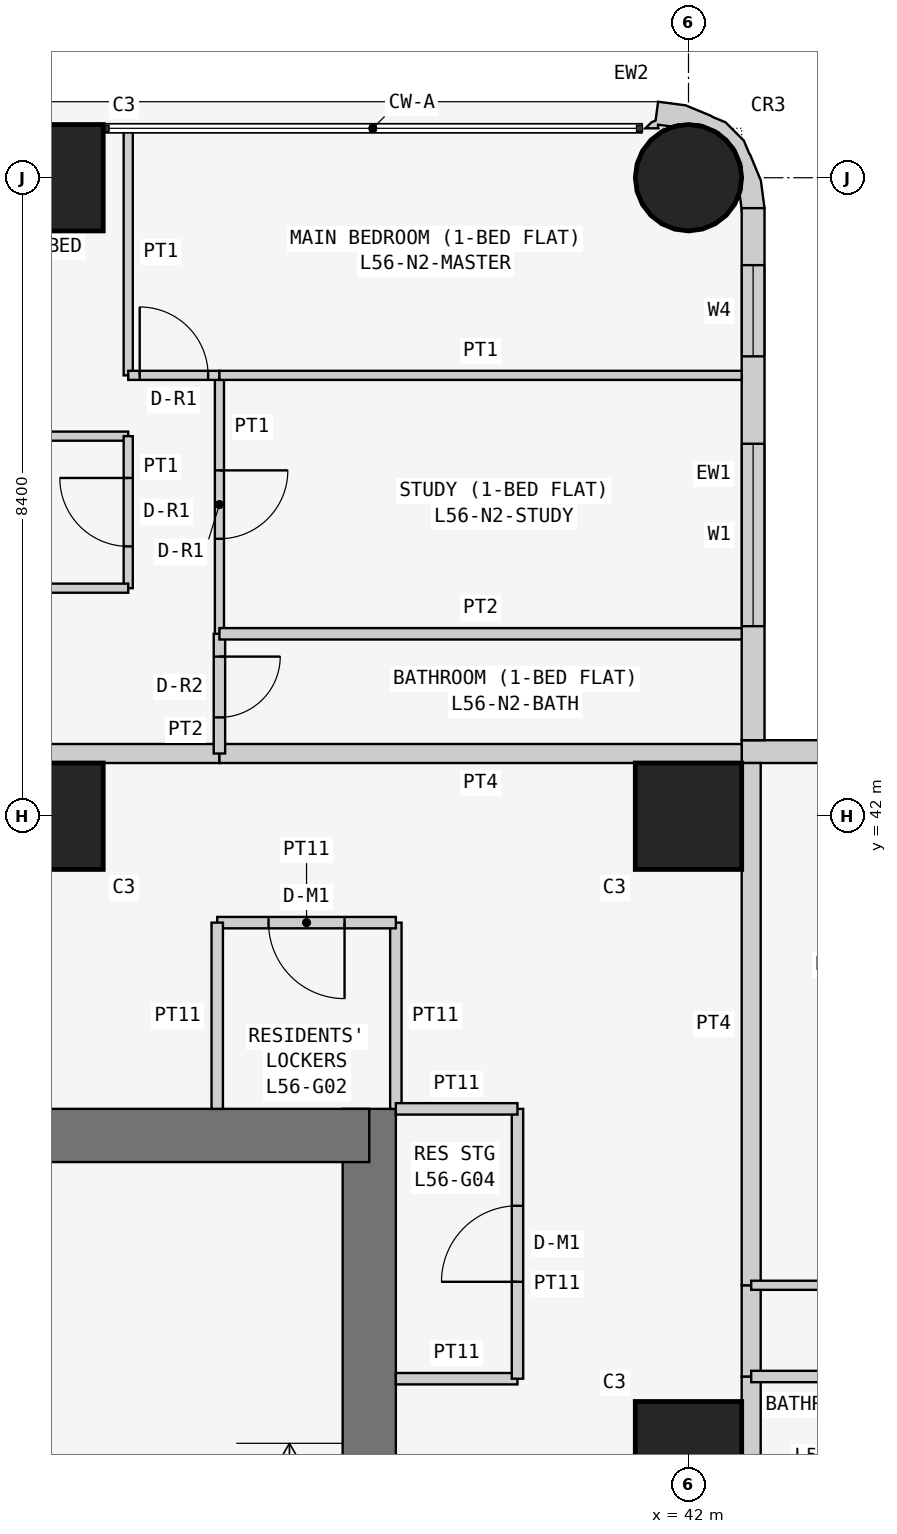
"""IFC4 building model, lengths in metres.
Left out: names, types, materials, properties, quantities, classifications, styles, units other than length and angle.
Written with IfcOpenShell. Run it as: python <this file> out.ifc"""

import sys

from ifc_helpers import new_model, si_unit, direction, frame, frame_2d, origin, origin_2d, place, context, subcontext, project, spatial, polyline, rectangle, circle, outline, extrude, element, fill, save


model = new_model("IFC4")
c1 = context("Model", 3, precision=1e-05, world=origin(), true_north=direction((0.0, 1.0)))
c2 = subcontext(c1, "Body", "Model", "MODEL_VIEW")
j1 = project(units=[si_unit("LENGTHUNIT", "METRE"), si_unit("PLANEANGLEUNIT", "RADIAN")], contexts=[c1])
p1 = place(None, origin())
s1 = spatial("IfcSite", under=j1, at=p1, CompositionType="ELEMENT")
p2 = place(p1, origin())
s2 = spatial("IfcBuilding", under=s1, at=p2, CompositionType="ELEMENT")
p3 = place(p2, frame((0.0, 0.0, 215.7)))
s3 = spatial("IfcBuildingStorey", under=s2, at=p3, CompositionType="ELEMENT", Elevation=215.7)
for number, where, z_axis, x_axis in (
    (1, (33.6, 42.0, 0.0), (0.0, 0.0, 1.0), (1.0, 0.0, 0.0)),
    (2, (33.6, 50.4, 0.0), (0.0, 0.0, 1.0), (1.0, 0.0, 0.0)),
    (3, (42.0, 33.6, 0.0), (0.0, 0.0, 1.0), (1.0, 0.0, 0.0)),
    (4, (42.0, 42.0, 0.0), (0.0, 0.0, 1.0), (1.0, 0.0, 0.0)),
):
    element("IfcColumn", number, at=place(p3, frame(where, z_axis=z_axis, x_axis=x_axis)), inside=s3, PredefinedType="COLUMN", context=c2, shape_type="SweptSolid", body=[
        extrude(rectangle(XDim=1.4, YDim=1.4, at=origin_2d()), origin(), (0.0, 0.0, 1.0), 3.6),
    ])
p4 = place(p3, frame((42.0, 50.4, 0.0), z_axis=(0.0, 0.0, 1.0), x_axis=(1.0, 0.0, 0.0)))
e5 = element("IfcColumn", 5, at=p4, inside=s3, PredefinedType="COLUMN", context=c2, shape_type="SweptSolid", body=[
    extrude(circle(Radius=0.7, at=origin_2d()), origin(), (0.0, 0.0, 1.0), 3.6),
])
p5 = place(p3, frame((37.8, 21.0, 0.0), z_axis=(0.0, 0.0, 1.0), x_axis=(0.0, 1.0, 0.0)))
e6 = element("IfcWall", 6, at=p5, inside=s3, PredefinedType="SHEAR", context=c2, shape_type="SweptSolid", body=[
    extrude(rectangle(XDim=17.15, YDim=0.7, at=frame_2d((8.575, 0.0))), origin(), (0.0, 0.0, 1.0), 3.6),
])
p6 = place(p5, frame((5.2, 0.0, 0.0)))
e7 = element("IfcOpeningElement", 7, at=p6, cuts=e6, PredefinedType="OPENING", context=c2, shape_type="SweptSolid", body=[
    extrude(rectangle(XDim=1.2, YDim=2.1, at=frame_2d((0.6, 1.05))), frame((0.0, 0.36, 0.0), z_axis=(0.0, -1.0, 0.0), x_axis=(1.0, 0.0, 0.0)), (0.0, 0.0, 1.0), 0.72),
])
p7 = place(p3, frame((37.8, 37.8, 0.0), z_axis=(0.0, 0.0, 1.0), x_axis=(-1.0, 0.0, 0.0)))
e8 = element("IfcWall", 8, at=p7, inside=s3, PredefinedType="SHEAR", context=c2, shape_type="SweptSolid", body=[
    extrude(rectangle(XDim=17.15, YDim=0.7, at=frame_2d((8.575, 0.0))), origin(), (0.0, 0.0, 1.0), 3.6),
])
p8 = place(p3, frame((50.0, 42.85, 0.0), z_axis=(0.0, 0.0, 1.0), x_axis=(-1.0, 0.0, 0.0)))
e9 = element("IfcWall", 9, at=p8, inside=s3, PredefinedType="SOLIDWALL", context=c2, shape_type="SweptSolid", body=[
    extrude(rectangle(XDim=7.3, YDim=0.3, at=frame_2d((3.65, 0.0))), origin(), (0.0, 0.0, 1.0), 3.45),
])
p9 = place(p8, frame((3.1, 0.0, 0.9)))
e10 = element("IfcOpeningElement", 10, at=p9, cuts=e9, PredefinedType="OPENING", context=c2, shape_type="SweptSolid", body=[
    extrude(rectangle(XDim=2.4, YDim=1.5, at=frame_2d((1.2, 0.75))), frame((0.0, 0.16, 0.0), z_axis=(0.0, -1.0, 0.0), x_axis=(1.0, 0.0, 0.0)), (0.0, 0.0, 1.0), 0.32),
])
p10 = place(p8, frame((0.75, 0.0, 0.9)))
e11 = element("IfcOpeningElement", 11, at=p10, cuts=e9, PredefinedType="OPENING", context=c2, shape_type="SweptSolid", body=[
    extrude(rectangle(XDim=1.2, YDim=1.5, at=frame_2d((0.6, 0.75))), frame((0.0, 0.16, 0.0), z_axis=(0.0, -1.0, 0.0), x_axis=(1.0, 0.0, 0.0)), (0.0, 0.0, 1.0), 0.32),
])
p11 = place(p3, frame((42.85, 43.0, 0.0), z_axis=(0.0, 0.0, 1.0), x_axis=(0.0, 1.0, 0.0)))
e12 = element("IfcWall", 12, at=p11, inside=s3, PredefinedType="SOLIDWALL", context=c2, shape_type="SweptSolid", body=[
    extrude(rectangle(XDim=7.0, YDim=0.3, at=frame_2d((3.5, 0.0))), origin(), (0.0, 0.0, 1.0), 3.45),
])
p12 = place(p11, frame((1.5, 0.0, 0.9)))
e13 = element("IfcOpeningElement", 13, at=p12, cuts=e12, PredefinedType="OPENING", context=c2, shape_type="SweptSolid", body=[
    extrude(rectangle(XDim=2.4, YDim=1.5, at=frame_2d((1.2, 0.75))), frame((0.0, 0.16, 0.0), z_axis=(0.0, -1.0, 0.0), x_axis=(1.0, 0.0, 0.0)), (0.0, 0.0, 1.0), 0.32),
])
p13 = place(p11, frame((5.05, 0.0, 0.9)))
e14 = element("IfcOpeningElement", 14, at=p13, cuts=e12, PredefinedType="OPENING", context=c2, shape_type="SweptSolid", body=[
    extrude(rectangle(XDim=1.2, YDim=1.5, at=frame_2d((0.6, 0.75))), frame((0.0, 0.16, 0.0), z_axis=(0.0, -1.0, 0.0), x_axis=(1.0, 0.0, 0.0)), (0.0, 0.0, 1.0), 0.32),
])
p14 = place(p3, frame((42.724, 50.11, 0.0), z_axis=(0.0, 0.0, 1.0), x_axis=(0.439933741929, 0.898030234854, 0.0)))
e15 = element("IfcWall", 15, at=p14, inside=s3, PredefinedType="SOLIDWALL", context=c2, shape_type="SweptSolid", body=[
    extrude(outline(polyline([(-0.145, -0.044), (0.022, -0.296), (0.327, -0.094), (0.568, 0.18), (0.577, 0.199), (0.7, 0.337), (0.811, 0.661), (0.799, 0.845), (0.803, 0.866), (0.78, 1.231), (0.664, 1.577), (0.426, 1.497), (0.382, 1.536), (0.276, 1.572), (0.349, 1.423), (0.392, 1.444), (0.453, 1.261), (0.51, 1.211), (0.632, 0.961), (0.65, 0.683), (0.56, 0.419), (0.375, 0.21), (0.125, 0.087), (0.05, 0.082), (-0.127, -0.035), (-0.145, -0.044)])), origin(), (0.0, 0.0, 1.0), 3.45),
])
p15 = place(p3, frame((38.15, 38.15, 0.0), z_axis=(0.0, 0.0, 1.0), x_axis=(0.0, 1.0, 0.0)))
e16 = element("IfcWall", 16, at=p15, inside=s3, PredefinedType="PARTITIONING", context=c2, shape_type="SweptSolid", body=[
    extrude(rectangle(XDim=2.45, YDim=0.15, at=frame_2d((1.225, 0.0))), origin(), (0.0, 0.0, 1.0), 3.45),
])
p16 = place(p3, frame((38.15, 40.6, 0.0), z_axis=(0.0, 0.0, 1.0), x_axis=(-1.0, 0.0, 0.0)))
e17 = element("IfcWall", 17, at=p16, inside=s3, PredefinedType="PARTITIONING", context=c2, shape_type="SweptSolid", body=[
    extrude(rectangle(XDim=2.35, YDim=0.15, at=frame_2d((1.175, 0.0))), origin(), (0.0, 0.0, 1.0), 3.45),
])
p17 = place(p16, frame((0.675, 0.0, 0.0)))
e18 = element("IfcOpeningElement", 18, at=p17, cuts=e17, PredefinedType="OPENING", context=c2, shape_type="SweptSolid", body=[
    extrude(rectangle(XDim=1.0, YDim=2.1, at=frame_2d((0.5, 1.05))), frame((0.0, 0.085, 0.0), z_axis=(0.0, -1.0, 0.0), x_axis=(1.0, 0.0, 0.0)), (0.0, 0.0, 1.0), 0.17),
])
p18 = place(p3, frame((35.8, 40.6, 0.0), z_axis=(0.0, 0.0, 1.0), x_axis=(0.0, -1.0, 0.0)))
e19 = element("IfcWall", 19, at=p18, inside=s3, PredefinedType="PARTITIONING", context=c2, shape_type="SweptSolid", body=[
    extrude(rectangle(XDim=2.45, YDim=0.15, at=frame_2d((1.225, 0.0))), origin(), (0.0, 0.0, 1.0), 3.45),
])
p19 = place(p3, frame((38.15, 34.6, 0.0), z_axis=(0.0, 0.0, 1.0), x_axis=(1.0, 0.0, 0.0)))
e20 = element("IfcWall", 20, at=p19, inside=s3, PredefinedType="PARTITIONING", context=c2, shape_type="SweptSolid", body=[
    extrude(rectangle(XDim=1.6, YDim=0.15, at=frame_2d((0.8, 0.0))), origin(), (0.0, 0.0, 1.0), 3.45),
])
p20 = place(p3, frame((39.75, 34.6, 0.0), z_axis=(0.0, 0.0, 1.0), x_axis=(0.0, 1.0, 0.0)))
e21 = element("IfcWall", 21, at=p20, inside=s3, PredefinedType="PARTITIONING", context=c2, shape_type="SweptSolid", body=[
    extrude(rectangle(XDim=3.55, YDim=0.15, at=frame_2d((1.775, 0.0))), origin(), (0.0, 0.0, 1.0), 3.45),
])
p21 = place(p20, frame((1.275, 0.0, 0.0)))
e22 = element("IfcOpeningElement", 22, at=p21, cuts=e21, PredefinedType="OPENING", context=c2, shape_type="SweptSolid", body=[
    extrude(rectangle(XDim=1.0, YDim=2.1, at=frame_2d((0.5, 1.05))), frame((0.0, 0.085, 0.0), z_axis=(0.0, -1.0, 0.0), x_axis=(1.0, 0.0, 0.0)), (0.0, 0.0, 1.0), 0.17),
])
p22 = place(p3, frame((39.75, 38.15, 0.0), z_axis=(0.0, 0.0, 1.0), x_axis=(-1.0, 0.0, 0.0)))
e23 = element("IfcWall", 23, at=p22, inside=s3, PredefinedType="PARTITIONING", context=c2, shape_type="SweptSolid", body=[
    extrude(rectangle(XDim=1.6, YDim=0.15, at=frame_2d((0.8, 0.0))), origin(), (0.0, 0.0, 1.0), 3.45),
])
p23 = place(p3, frame((29.4, 42.825, 0.0), z_axis=(0.0, 0.0, 1.0), x_axis=(1.0, 0.0, 0.0)))
e24 = element("IfcWall", 24, at=p23, inside=s3, PredefinedType="PARTITIONING", context=c2, shape_type="SweptSolid", body=[
    extrude(rectangle(XDim=6.429, YDim=0.25, at=frame_2d((3.215, 0.0))), origin(), (0.0, 0.0, 1.0), 3.45),
])
p24 = place(p23, frame((0.5, 0.0, 0.0)))
e25 = element("IfcOpeningElement", 25, at=p24, cuts=e24, PredefinedType="OPENING", context=c2, shape_type="SweptSolid", body=[
    extrude(rectangle(XDim=1.0, YDim=2.1, at=frame_2d((0.5, 1.05))), frame((0.0, 0.135, 0.0), z_axis=(0.0, -1.0, 0.0), x_axis=(1.0, 0.0, 0.0)), (0.0, 0.0, 1.0), 0.27),
])
p25 = place(p3, frame((35.829, 42.825, 0.0), z_axis=(0.0, 0.0, 1.0), x_axis=(1.0, 0.0, 0.0)))
e26 = element("IfcWall", 26, at=p25, inside=s3, PredefinedType="PARTITIONING", context=c2, shape_type="SweptSolid", body=[
    extrude(rectangle(XDim=6.871, YDim=0.25, at=frame_2d((3.436, 0.0))), origin(), (0.0, 0.0, 1.0), 3.45),
])
p26 = place(p3, frame((42.825, 34.629, 0.0), z_axis=(0.0, 0.0, 1.0), x_axis=(0.0, -1.0, 0.0)))
e27 = element("IfcWall", 27, at=p26, inside=s3, PredefinedType="PARTITIONING", context=c2, shape_type="SweptSolid", body=[
    extrude(rectangle(XDim=2.629, YDim=0.25, at=frame_2d((1.314, 0.0))), origin(), (0.0, 0.0, 1.0), 3.45),
])
p27 = place(p3, frame((42.825, 35.829, 0.0), z_axis=(0.0, 0.0, 1.0), x_axis=(0.0, -1.0, 0.0)))
e28 = element("IfcWall", 28, at=p27, inside=s3, PredefinedType="PARTITIONING", context=c2, shape_type="SweptSolid", body=[
    extrude(rectangle(XDim=1.2, YDim=0.25, at=frame_2d((0.6, 0.0))), origin(), (0.0, 0.0, 1.0), 3.45),
])
p28 = place(p3, frame((42.825, 42.7, 0.0), z_axis=(0.0, 0.0, 1.0), x_axis=(0.0, -1.0, 0.0)))
e29 = element("IfcWall", 29, at=p28, inside=s3, PredefinedType="PARTITIONING", context=c2, shape_type="SweptSolid", body=[
    extrude(rectangle(XDim=6.871, YDim=0.25, at=frame_2d((3.436, 0.0))), origin(), (0.0, 0.0, 1.0), 3.45),
])
p29 = place(p3, frame((29.4, 47.0, 0.0), z_axis=(0.0, 0.0, 1.0), x_axis=(1.0, 0.0, 0.0)))
e30 = element("IfcWall", 30, at=p29, inside=s3, PredefinedType="PARTITIONING", context=c2, shape_type="SweptSolid", body=[
    extrude(rectangle(XDim=5.229, YDim=0.12, at=frame_2d((2.615, 0.0))), origin(), (0.0, 0.0, 1.0), 3.45),
])
p30 = place(p3, frame((34.629, 47.0, 0.0), z_axis=(0.0, 0.0, 1.0), x_axis=(0.0, -1.0, 0.0)))
e31 = element("IfcWall", 31, at=p30, inside=s3, PredefinedType="PARTITIONING", context=c2, shape_type="SweptSolid", body=[
    extrude(rectangle(XDim=2.0, YDim=0.12, at=frame_2d((1.0, 0.0))), origin(), (0.0, 0.0, 1.0), 3.45),
])
p31 = place(p30, frame((0.55, 0.0, 0.0)))
e32 = element("IfcOpeningElement", 32, at=p31, cuts=e31, PredefinedType="OPENING", context=c2, shape_type="SweptSolid", body=[
    extrude(rectangle(XDim=0.9, YDim=2.1, at=frame_2d((0.45, 1.05))), frame((0.0, 0.07, 0.0), z_axis=(0.0, -1.0, 0.0), x_axis=(1.0, 0.0, 0.0)), (0.0, 0.0, 1.0), 0.14),
])
p32 = place(p3, frame((34.629, 45.0, 0.0), z_axis=(0.0, 0.0, 1.0), x_axis=(-1.0, 0.0, 0.0)))
e33 = element("IfcWall", 33, at=p32, inside=s3, PredefinedType="PARTITIONING", context=c2, shape_type="SweptSolid", body=[
    extrude(rectangle(XDim=5.229, YDim=0.12, at=frame_2d((2.615, 0.0))), origin(), (0.0, 0.0, 1.0), 3.45),
])
p33 = place(p3, frame((35.829, 44.4, 0.0), z_axis=(0.0, 0.0, 1.0), x_axis=(0.0, -1.0, 0.0)))
e34 = element("IfcWall", 34, at=p33, inside=s3, PredefinedType="PARTITIONING", context=c2, shape_type="SweptSolid", body=[
    extrude(rectangle(XDim=1.575, YDim=0.15, at=frame_2d((0.788, 0.0))), origin(), (0.0, 0.0, 1.0), 3.45),
])
p34 = place(p33, frame((0.3, 0.0, 0.0)))
e35 = element("IfcOpeningElement", 35, at=p34, cuts=e34, PredefinedType="OPENING", context=c2, shape_type="SweptSolid", body=[
    extrude(rectangle(XDim=0.8, YDim=2.1, at=frame_2d((0.4, 1.05))), frame((0.0, 0.085, 0.0), z_axis=(0.0, -1.0, 0.0), x_axis=(1.0, 0.0, 0.0)), (0.0, 0.0, 1.0), 0.17),
])
p35 = place(p3, frame((35.829, 47.8, 0.0), z_axis=(0.0, 0.0, 1.0), x_axis=(0.0, -1.0, 0.0)))
e36 = element("IfcWall", 36, at=p35, inside=s3, PredefinedType="PARTITIONING", context=c2, shape_type="SweptSolid", body=[
    extrude(rectangle(XDim=3.4, YDim=0.12, at=frame_2d((1.7, 0.0))), origin(), (0.0, 0.0, 1.0), 3.45),
])
p36 = place(p35, frame((1.25, 0.0, 0.0)))
e37 = element("IfcOpeningElement", 37, at=p36, cuts=e36, PredefinedType="OPENING", context=c2, shape_type="SweptSolid", body=[
    extrude(rectangle(XDim=0.9, YDim=2.1, at=frame_2d((0.45, 1.05))), frame((0.0, 0.07, 0.0), z_axis=(0.0, -1.0, 0.0), x_axis=(1.0, 0.0, 0.0)), (0.0, 0.0, 1.0), 0.14),
])
p37 = place(p3, frame((34.629, 51.05, 0.0), z_axis=(0.0, 0.0, 1.0), x_axis=(0.0, -1.0, 0.0)))
e38 = element("IfcWall", 38, at=p37, inside=s3, PredefinedType="PARTITIONING", context=c2, shape_type="SweptSolid", body=[
    extrude(rectangle(XDim=3.25, YDim=0.12, at=frame_2d((1.625, 0.0))), origin(), (0.0, 0.0, 1.0), 3.45),
])
p38 = place(p3, frame((34.629, 47.8, 0.0), z_axis=(0.0, 0.0, 1.0), x_axis=(1.0, 0.0, 0.0)))
e39 = element("IfcWall", 39, at=p38, inside=s3, PredefinedType="PARTITIONING", context=c2, shape_type="SweptSolid", body=[
    extrude(rectangle(XDim=1.2, YDim=0.12, at=frame_2d((0.6, 0.0))), origin(), (0.0, 0.0, 1.0), 3.45),
])
p39 = place(p38, frame((0.151, 0.0, 0.0)))
e40 = element("IfcOpeningElement", 40, at=p39, cuts=e39, PredefinedType="OPENING", context=c2, shape_type="SweptSolid", body=[
    extrude(rectangle(XDim=0.9, YDim=2.1, at=frame_2d((0.45, 1.05))), frame((0.0, 0.07, 0.0), z_axis=(0.0, -1.0, 0.0), x_axis=(1.0, 0.0, 0.0)), (0.0, 0.0, 1.0), 0.14),
])
p40 = place(p3, frame((35.829, 44.4, 0.0), z_axis=(0.0, 0.0, 1.0), x_axis=(1.0, 0.0, 0.0)))
e41 = element("IfcWall", 41, at=p40, inside=s3, PredefinedType="PARTITIONING", context=c2, shape_type="SweptSolid", body=[
    extrude(rectangle(XDim=6.871, YDim=0.15, at=frame_2d((3.436, 0.0))), origin(), (0.0, 0.0, 1.0), 3.45),
])
p41 = place(p3, frame((35.829, 47.8, 0.0), z_axis=(0.0, 0.0, 1.0), x_axis=(1.0, 0.0, 0.0)))
e42 = element("IfcWall", 42, at=p41, inside=s3, PredefinedType="PARTITIONING", context=c2, shape_type="SweptSolid", body=[
    extrude(rectangle(XDim=6.871, YDim=0.12, at=frame_2d((3.436, 0.0))), origin(), (0.0, 0.0, 1.0), 3.45),
])
p42 = place(p3, frame((46.0, 34.629, 0.0), z_axis=(0.0, 0.0, 1.0), x_axis=(-1.0, 0.0, 0.0)))
e43 = element("IfcWall", 43, at=p42, inside=s3, PredefinedType="PARTITIONING", context=c2, shape_type="SweptSolid", body=[
    extrude(rectangle(XDim=3.175, YDim=0.15, at=frame_2d((1.587, 0.0))), origin(), (0.0, 0.0, 1.0), 3.45),
])
p43 = place(p3, frame((42.825, 35.829, 0.0), z_axis=(0.0, 0.0, 1.0), x_axis=(1.0, 0.0, 0.0)))
e44 = element("IfcWall", 44, at=p43, inside=s3, PredefinedType="PARTITIONING", context=c2, shape_type="SweptSolid", body=[
    extrude(rectangle(XDim=4.975, YDim=0.12, at=frame_2d((2.488, 0.0))), origin(), (0.0, 0.0, 1.0), 3.45),
])
p44 = place(p43, frame((2.125, 0.0, 0.0)))
e45 = element("IfcOpeningElement", 45, at=p44, cuts=e44, PredefinedType="OPENING", context=c2, shape_type="SweptSolid", body=[
    extrude(rectangle(XDim=0.9, YDim=2.1, at=frame_2d((0.45, 1.05))), frame((0.0, 0.07, 0.0), z_axis=(0.0, -1.0, 0.0), x_axis=(1.0, 0.0, 0.0)), (0.0, 0.0, 1.0), 0.14),
])
p45 = place(p12, origin())
e46 = element("IfcWindow", 46, at=p45, inside=s3, PartitioningType="SINGLE_PANEL", PredefinedType="WINDOW", context=c2, shape_type="SweptSolid", body=[
    extrude(rectangle(XDim=2.4, YDim=1.5, at=frame_2d((1.2, 0.75))), frame((0.0, 0.03, 0.0), z_axis=(0.0, -1.0, 0.0), x_axis=(1.0, 0.0, 0.0)), (0.0, 0.0, 1.0), 0.06),
])
fill(e13, e46)
p46 = place(p13, origin())
e47 = element("IfcWindow", 47, at=p46, inside=s3, PartitioningType="SINGLE_PANEL", PredefinedType="WINDOW", context=c2, shape_type="SweptSolid", body=[
    extrude(rectangle(XDim=1.2, YDim=1.5, at=frame_2d((0.6, 0.75))), frame((0.0, 0.03, 0.0), z_axis=(0.0, -1.0, 0.0), x_axis=(1.0, 0.0, 0.0)), (0.0, 0.0, 1.0), 0.06),
])
fill(e14, e47)
p47 = place(p17, origin())
e48 = element("IfcDoor", 48, at=p47, inside=s3, OperationType="SINGLE_SWING_LEFT", PredefinedType="DOOR", context=c2, shape_type="SweptSolid", body=[
    extrude(rectangle(XDim=1.0, YDim=2.1, at=frame_2d((0.5, 1.05))), frame((0.0, 0.025, 0.0), z_axis=(0.0, -1.0, 0.0), x_axis=(1.0, 0.0, 0.0)), (0.0, 0.0, 1.0), 0.05),
])
fill(e18, e48)
p48 = place(p21, origin())
e49 = element("IfcDoor", 49, at=p48, inside=s3, OperationType="SINGLE_SWING_LEFT", PredefinedType="DOOR", context=c2, shape_type="SweptSolid", body=[
    extrude(rectangle(XDim=1.0, YDim=2.1, at=frame_2d((0.5, 1.05))), frame((0.0, 0.025, 0.0), z_axis=(0.0, -1.0, 0.0), x_axis=(1.0, 0.0, 0.0)), (0.0, 0.0, 1.0), 0.05),
])
fill(e22, e49)
p49 = place(p31, frame((0.9, 0.0, 0.0), z_axis=(0.0, 0.0, 1.0), x_axis=(-1.0, 0.0, 0.0)))
e50 = element("IfcDoor", 50, at=p49, inside=s3, OperationType="SINGLE_SWING_RIGHT", PredefinedType="DOOR", context=c2, shape_type="SweptSolid", body=[
    extrude(rectangle(XDim=0.9, YDim=2.1, at=frame_2d((0.45, 1.05))), frame((0.0, 0.025, 0.0), z_axis=(0.0, -1.0, 0.0), x_axis=(1.0, 0.0, 0.0)), (0.0, 0.0, 1.0), 0.05),
])
fill(e32, e50)
p50 = place(p34, origin())
e51 = element("IfcDoor", 51, at=p50, inside=s3, OperationType="SINGLE_SWING_LEFT", PredefinedType="DOOR", context=c2, shape_type="SweptSolid", body=[
    extrude(rectangle(XDim=0.8, YDim=2.1, at=frame_2d((0.4, 1.05))), frame((0.0, 0.025, 0.0), z_axis=(0.0, -1.0, 0.0), x_axis=(1.0, 0.0, 0.0)), (0.0, 0.0, 1.0), 0.05),
])
fill(e35, e51)
p51 = place(p36, origin())
e52 = element("IfcDoor", 52, at=p51, inside=s3, OperationType="SINGLE_SWING_LEFT", PredefinedType="DOOR", context=c2, shape_type="SweptSolid", body=[
    extrude(rectangle(XDim=0.9, YDim=2.1, at=frame_2d((0.45, 1.05))), frame((0.0, 0.025, 0.0), z_axis=(0.0, -1.0, 0.0), x_axis=(1.0, 0.0, 0.0)), (0.0, 0.0, 1.0), 0.05),
])
fill(e37, e52)
p52 = place(p39, origin())
e53 = element("IfcDoor", 53, at=p52, inside=s3, OperationType="SINGLE_SWING_LEFT", PredefinedType="DOOR", context=c2, shape_type="SweptSolid", body=[
    extrude(rectangle(XDim=0.9, YDim=2.1, at=frame_2d((0.45, 1.05))), frame((0.0, 0.025, 0.0), z_axis=(0.0, -1.0, 0.0), x_axis=(1.0, 0.0, 0.0)), (0.0, 0.0, 1.0), 0.05),
])
fill(e40, e53)
save(model, sys.argv[1])
